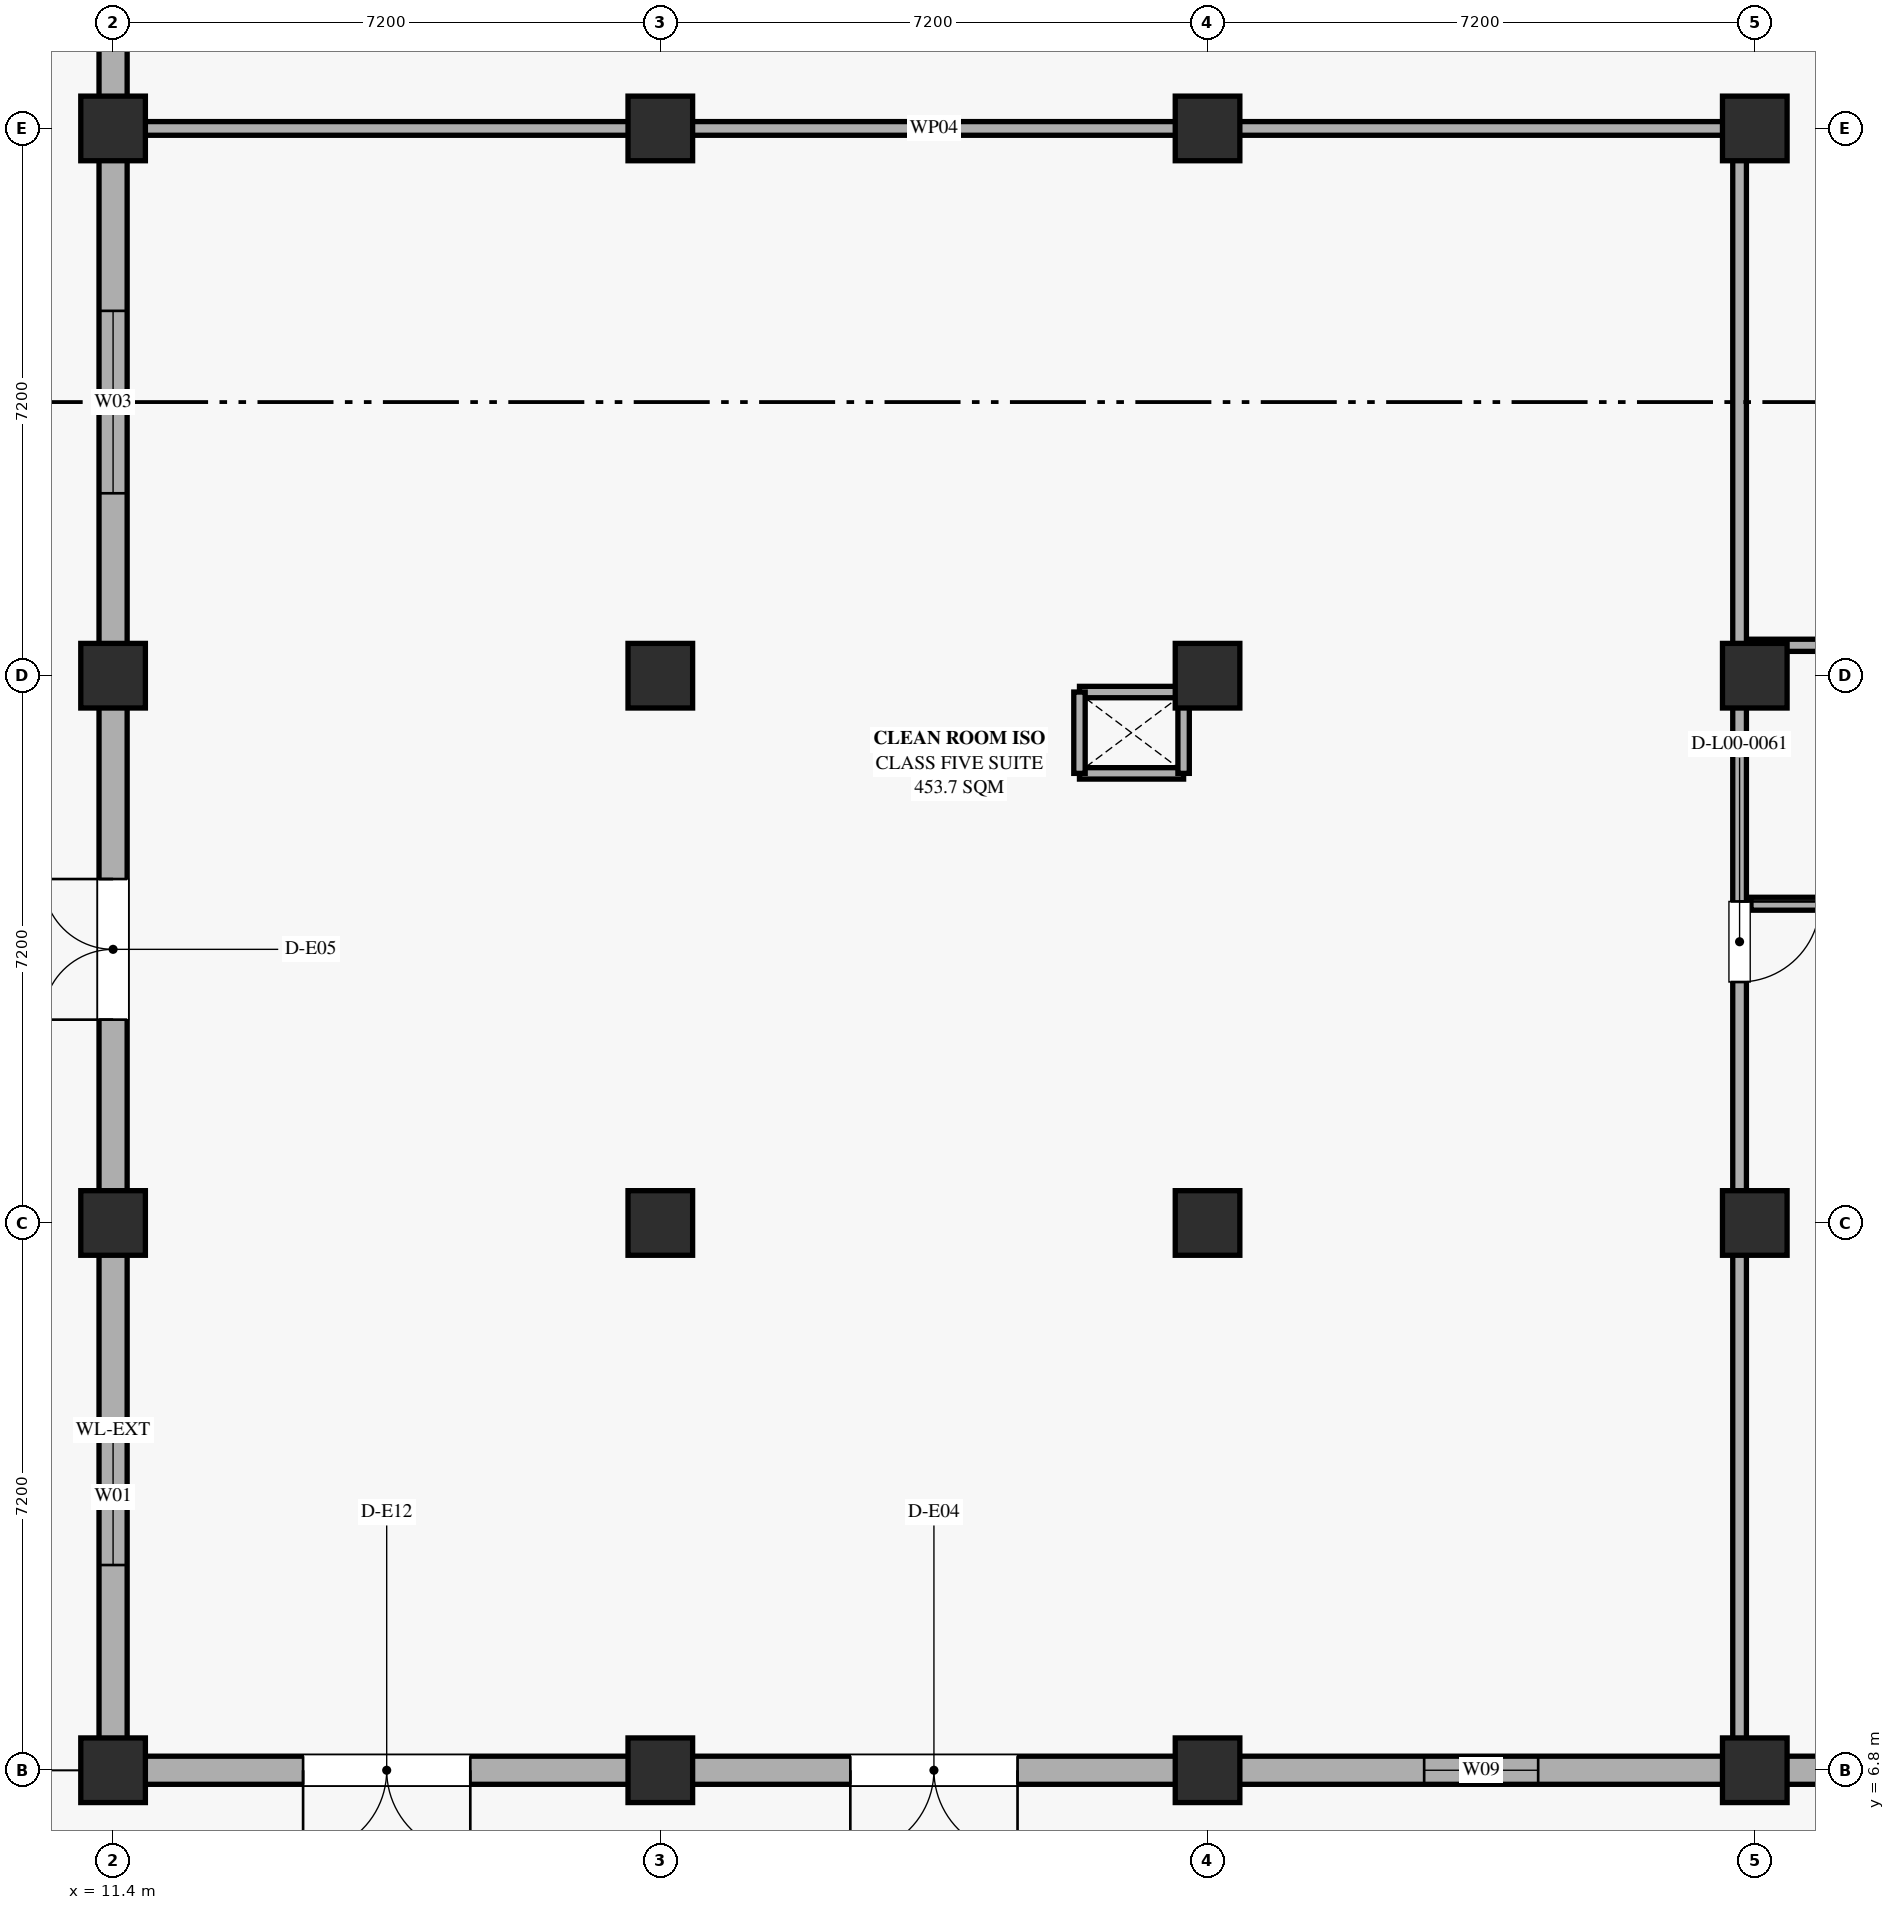
"""IFC4 building model, lengths in metres.
Left out: names, types, materials, properties, quantities, classifications, styles, units other than length and angle.
Written with IfcOpenShell. Run it as: python <this file> out.ifc"""

import sys

from ifc_helpers import new_model, si_unit, direction, frame, frame_2d, origin, origin_2d, place, context, subcontext, project, spatial, rectangle, extrude, element, fill, save


model = new_model("IFC4")
c1 = context("Model", 3, precision=1e-05, world=origin(), true_north=direction((0.0, 1.0)))
c2 = subcontext(c1, "Body", "Model", "MODEL_VIEW")
j1 = project(units=[si_unit("LENGTHUNIT", "METRE"), si_unit("PLANEANGLEUNIT", "RADIAN")], contexts=[c1])
p1 = place(None, origin())
s1 = spatial("IfcSite", under=j1, at=p1, CompositionType="ELEMENT")
p2 = place(p1, origin())
s2 = spatial("IfcBuilding", under=s1, at=p2, CompositionType="ELEMENT")
p3 = place(p2, origin())
s3 = spatial("IfcBuildingStorey", under=s2, at=p3, CompositionType="ELEMENT", Elevation=0.0)
for number, where, z_axis, x_axis in (
    (1, (11.4, 6.8, 0.0), (0.0, 0.0, 1.0), (1.0, 0.0, 0.0)),
    (2, (18.6, 6.8, 0.0), (0.0, 0.0, 1.0), (1.0, 0.0, 0.0)),
    (3, (25.8, 6.8, 0.0), (0.0, 0.0, 1.0), (1.0, 0.0, 0.0)),
    (4, (33.0, 6.8, 0.0), (0.0, 0.0, 1.0), (1.0, 0.0, 0.0)),
    (5, (11.4, 14.0, 0.0), (0.0, 0.0, 1.0), (1.0, 0.0, 0.0)),
    (6, (18.6, 14.0, 0.0), (0.0, 0.0, 1.0), (1.0, 0.0, 0.0)),
    (7, (25.8, 14.0, 0.0), (0.0, 0.0, 1.0), (1.0, 0.0, 0.0)),
    (8, (33.0, 14.0, 0.0), (0.0, 0.0, 1.0), (1.0, 0.0, 0.0)),
    (9, (11.4, 21.2, 0.0), (0.0, 0.0, 1.0), (1.0, 0.0, 0.0)),
    (10, (18.6, 21.2, 0.0), (0.0, 0.0, 1.0), (1.0, 0.0, 0.0)),
    (11, (25.8, 21.2, 0.0), (0.0, 0.0, 1.0), (1.0, 0.0, 0.0)),
    (12, (33.0, 21.2, 0.0), (0.0, 0.0, 1.0), (1.0, 0.0, 0.0)),
    (13, (11.4, 28.4, 0.0), (0.0, 0.0, 1.0), (1.0, 0.0, 0.0)),
    (14, (18.6, 28.4, 0.0), (0.0, 0.0, 1.0), (1.0, 0.0, 0.0)),
    (15, (25.8, 28.4, 0.0), (0.0, 0.0, 1.0), (1.0, 0.0, 0.0)),
    (16, (33.0, 28.4, 0.0), (0.0, 0.0, 1.0), (1.0, 0.0, 0.0)),
):
    element("IfcColumn", number, at=place(p3, frame(where, z_axis=z_axis, x_axis=x_axis)), inside=s3, PredefinedType="COLUMN", context=c2, shape_type="SweptSolid", body=[
        extrude(rectangle(XDim=0.85, YDim=0.85, at=origin_2d()), origin(), (0.0, 0.0, 1.0), 5.4),
    ])
p4 = place(p3, frame((11.4, 7.21, 0.0), z_axis=(0.0, 0.0, 1.0), x_axis=(0.0, 1.0, 0.0)))
e17 = element("IfcWall", 17, at=p4, inside=s3, PredefinedType="SOLIDWALL", context=c2, shape_type="SweptSolid", body=[
    extrude(rectangle(XDim=6.38, YDim=0.37, at=frame_2d((3.19, 0.0))), origin(), (0.0, 0.0, 1.0), 3.9),
])
p5 = place(p4, frame((2.29, 0.0, 0.9)))
e18 = element("IfcOpeningElement", 18, at=p5, cuts=e17, PredefinedType="OPENING", context=c2, shape_type="SweptSolid", body=[
    extrude(rectangle(XDim=1.8, YDim=2.4, at=frame_2d((0.9, 1.2))), frame((0.0, 0.195, 0.0), z_axis=(0.0, -1.0, 0.0), x_axis=(1.0, 0.0, 0.0)), (0.0, 0.0, 1.0), 0.39),
])
p6 = place(p3, frame((11.4, 14.41, 0.0), z_axis=(0.0, 0.0, 1.0), x_axis=(0.0, 1.0, 0.0)))
e19 = element("IfcWall", 19, at=p6, inside=s3, PredefinedType="SOLIDWALL", context=c2, shape_type="SweptSolid", body=[
    extrude(rectangle(XDim=6.38, YDim=0.37, at=frame_2d((3.19, 0.0))), origin(), (0.0, 0.0, 1.0), 3.9),
])
p7 = place(p6, frame((2.265, 0.0, 0.0)))
e20 = element("IfcOpeningElement", 20, at=p7, cuts=e19, PredefinedType="OPENING", context=c2, shape_type="SweptSolid", body=[
    extrude(rectangle(XDim=1.85, YDim=2.35, at=frame_2d((0.925, 1.175))), frame((0.0, 0.195, 0.0), z_axis=(0.0, -1.0, 0.0), x_axis=(1.0, 0.0, 0.0)), (0.0, 0.0, 1.0), 0.39),
])
p8 = place(p3, frame((11.4, 21.61, 0.0), z_axis=(0.0, 0.0, 1.0), x_axis=(0.0, 1.0, 0.0)))
e21 = element("IfcWall", 21, at=p8, inside=s3, PredefinedType="SOLIDWALL", context=c2, shape_type="SweptSolid", body=[
    extrude(rectangle(XDim=6.38, YDim=0.37, at=frame_2d((3.19, 0.0))), origin(), (0.0, 0.0, 1.0), 3.9),
])
p9 = place(p8, frame((1.99, 0.0, 0.9)))
e22 = element("IfcOpeningElement", 22, at=p9, cuts=e21, PredefinedType="OPENING", context=c2, shape_type="SweptSolid", body=[
    extrude(rectangle(XDim=2.4, YDim=2.4, at=frame_2d((1.2, 1.2))), frame((0.0, 0.195, 0.0), z_axis=(0.0, -1.0, 0.0), x_axis=(1.0, 0.0, 0.0)), (0.0, 0.0, 1.0), 0.39),
])
p10 = place(p3, frame((11.4, 28.81, 0.0), z_axis=(0.0, 0.0, 1.0), x_axis=(0.0, 1.0, 0.0)))
e23 = element("IfcWall", 23, at=p10, inside=s3, PredefinedType="SOLIDWALL", context=c2, shape_type="SweptSolid", body=[
    extrude(rectangle(XDim=6.38, YDim=0.37, at=frame_2d((3.19, 0.0))), origin(), (0.0, 0.0, 1.0), 3.9),
])
p11 = place(p10, frame((2.44, 0.0, 0.9)))
e24 = element("IfcOpeningElement", 24, at=p11, cuts=e23, PredefinedType="OPENING", context=c2, shape_type="SweptSolid", body=[
    extrude(rectangle(XDim=1.5, YDim=2.4, at=frame_2d((0.75, 1.2))), frame((0.0, 0.195, 0.0), z_axis=(0.0, -1.0, 0.0), x_axis=(1.0, 0.0, 0.0)), (0.0, 0.0, 1.0), 0.39),
])
p12 = place(p3, frame((39.79, 6.8, 0.0), z_axis=(0.0, 0.0, 1.0), x_axis=(-1.0, 0.0, 0.0)))
e25 = element("IfcWall", 25, at=p12, inside=s3, PredefinedType="SOLIDWALL", context=c2, shape_type="SweptSolid", body=[
    extrude(rectangle(XDim=6.38, YDim=0.37, at=frame_2d((3.19, 0.0))), origin(), (0.0, 0.0, 1.0), 3.9),
])
p13 = place(p12, frame((2.09, 0.0, 0.0)))
e26 = element("IfcOpeningElement", 26, at=p13, cuts=e25, PredefinedType="OPENING", context=c2, shape_type="SweptSolid", body=[
    extrude(rectangle(XDim=2.2, YDim=2.4, at=frame_2d((1.1, 1.2))), frame((0.0, 0.195, 0.0), z_axis=(0.0, -1.0, 0.0), x_axis=(1.0, 0.0, 0.0)), (0.0, 0.0, 1.0), 0.39),
])
p14 = place(p3, frame((32.59, 6.8, 0.0), z_axis=(0.0, 0.0, 1.0), x_axis=(-1.0, 0.0, 0.0)))
e27 = element("IfcWall", 27, at=p14, inside=s3, PredefinedType="SOLIDWALL", context=c2, shape_type="SweptSolid", body=[
    extrude(rectangle(XDim=6.38, YDim=0.37, at=frame_2d((3.19, 0.0))), origin(), (0.0, 0.0, 1.0), 3.9),
])
p15 = place(p14, frame((2.44, 0.0, 0.9)))
e28 = element("IfcOpeningElement", 28, at=p15, cuts=e27, PredefinedType="OPENING", context=c2, shape_type="SweptSolid", body=[
    extrude(rectangle(XDim=1.5, YDim=2.1, at=frame_2d((0.75, 1.05))), frame((0.0, 0.195, 0.0), z_axis=(0.0, -1.0, 0.0), x_axis=(1.0, 0.0, 0.0)), (0.0, 0.0, 1.0), 0.39),
])
p16 = place(p3, frame((25.39, 6.8, 0.0), z_axis=(0.0, 0.0, 1.0), x_axis=(-1.0, 0.0, 0.0)))
e29 = element("IfcWall", 29, at=p16, inside=s3, PredefinedType="SOLIDWALL", context=c2, shape_type="SweptSolid", body=[
    extrude(rectangle(XDim=6.38, YDim=0.37, at=frame_2d((3.19, 0.0))), origin(), (0.0, 0.0, 1.0), 3.9),
])
p17 = place(p16, frame((2.09, 0.0, 0.0)))
e30 = element("IfcOpeningElement", 30, at=p17, cuts=e29, PredefinedType="OPENING", context=c2, shape_type="SweptSolid", body=[
    extrude(rectangle(XDim=2.2, YDim=2.4, at=frame_2d((1.1, 1.2))), frame((0.0, 0.195, 0.0), z_axis=(0.0, -1.0, 0.0), x_axis=(1.0, 0.0, 0.0)), (0.0, 0.0, 1.0), 0.39),
])
p18 = place(p3, frame((18.19, 6.8, 0.0), z_axis=(0.0, 0.0, 1.0), x_axis=(-1.0, 0.0, 0.0)))
e31 = element("IfcWall", 31, at=p18, inside=s3, PredefinedType="SOLIDWALL", context=c2, shape_type="SweptSolid", body=[
    extrude(rectangle(XDim=6.38, YDim=0.37, at=frame_2d((3.19, 0.0))), origin(), (0.0, 0.0, 1.0), 3.9),
])
p19 = place(p18, frame((2.09, 0.0, 0.0)))
e32 = element("IfcOpeningElement", 32, at=p19, cuts=e31, PredefinedType="OPENING", context=c2, shape_type="SweptSolid", body=[
    extrude(rectangle(XDim=2.2, YDim=2.4, at=frame_2d((1.1, 1.2))), frame((0.0, 0.195, 0.0), z_axis=(0.0, -1.0, 0.0), x_axis=(1.0, 0.0, 0.0)), (0.0, 0.0, 1.0), 0.39),
])
for number, where, z_axis, x_axis in (
    (33, (25.485, 19.915, 0.0), (0.0, 0.0, 1.0), (-1.0, 0.0, 0.0)),
    (34, (24.115, 20.985, 0.0), (0.0, 0.0, 1.0), (1.0, 0.0, 0.0)),
):
    element("IfcWall", number, at=place(p3, frame(where, z_axis=z_axis, x_axis=x_axis)), inside=s3, PredefinedType="PARTITIONING", context=c2, shape_type="SweptSolid", body=[
        extrude(rectangle(XDim=1.37, YDim=0.15, at=frame_2d((0.685, 0.0))), origin(), (0.0, 0.0, 1.0), 3.88),
    ])
for number, where, z_axis, x_axis in (
    (35, (24.115, 19.915, 0.0), (0.0, 0.0, 1.0), (0.0, 1.0, 0.0)),
    (36, (25.485, 20.985, 0.0), (0.0, 0.0, 1.0), (0.0, -1.0, 0.0)),
):
    element("IfcWall", number, at=place(p3, frame(where, z_axis=z_axis, x_axis=x_axis)), inside=s3, PredefinedType="PARTITIONING", context=c2, shape_type="SweptSolid", body=[
        extrude(rectangle(XDim=1.07, YDim=0.15, at=frame_2d((0.535, 0.0))), origin(), (0.0, 0.0, 1.0), 3.88),
    ])
p20 = place(p3, frame((11.75, 28.4, 0.0), z_axis=(0.0, 0.0, 1.0), x_axis=(1.0, 0.0, 0.0)))
e37 = element("IfcWall", 37, at=p20, inside=s3, PredefinedType="PARTITIONING", context=c2, shape_type="SweptSolid", body=[
    extrude(rectangle(XDim=20.9, YDim=0.18, at=frame_2d((10.45, 0.0))), origin(), (0.0, 0.0, 1.0), 3.88),
])
p21 = place(p3, frame((32.8, 28.25, 0.0), z_axis=(0.0, 0.0, 1.0), x_axis=(0.0, -1.0, 0.0)))
e38 = element("IfcWall", 38, at=p21, inside=s3, PredefinedType="PARTITIONING", context=c2, shape_type="SweptSolid", body=[
    extrude(rectangle(XDim=21.1, YDim=0.18, at=frame_2d((10.55, 0.0))), origin(), (0.0, 0.0, 1.0), 3.88),
])
p22 = place(p21, frame((10.02, 0.0, 0.0)))
e39 = element("IfcOpeningElement", 39, at=p22, cuts=e38, PredefinedType="OPENING", context=c2, shape_type="SweptSolid", body=[
    extrude(rectangle(XDim=1.06, YDim=2.18, at=frame_2d((0.53, 1.09))), frame((0.0, 0.1, 0.0), z_axis=(0.0, -1.0, 0.0), x_axis=(1.0, 0.0, 0.0)), (0.0, 0.0, 1.0), 0.2),
])
p23 = place(p3, frame((32.95, 18.2, 0.0), z_axis=(0.0, 0.0, 1.0), x_axis=(1.0, 0.0, 0.0)))
e40 = element("IfcWall", 40, at=p23, inside=s3, PredefinedType="PARTITIONING", context=c2, shape_type="SweptSolid", body=[
    extrude(rectangle(XDim=21.5, YDim=0.17, at=frame_2d((10.75, 0.0))), origin(), (0.0, 0.0, 1.0), 3.88),
])
p24 = place(p23, frame((10.3, 0.0, 0.0)))
e41 = element("IfcOpeningElement", 41, at=p24, cuts=e40, PredefinedType="OPENING", context=c2, shape_type="SweptSolid", body=[
    extrude(rectangle(XDim=1.1, YDim=2.06, at=frame_2d((0.55, 1.03))), frame((0.0, 0.095, 0.0), z_axis=(0.0, -1.0, 0.0), x_axis=(1.0, 0.0, 0.0)), (0.0, 0.0, 1.0), 0.19),
])
p25 = place(p3, frame((52.05, 21.6, 0.0), z_axis=(0.0, 0.0, 1.0), x_axis=(-1.0, 0.0, 0.0)))
e42 = element("IfcWall", 42, at=p25, inside=s3, PredefinedType="PARTITIONING", context=c2, shape_type="SweptSolid", body=[
    extrude(rectangle(XDim=19.1, YDim=0.16, at=frame_2d((9.55, 0.0))), origin(), (0.0, 0.0, 1.0), 3.88),
])
p26 = place(p25, frame((7.7, 0.0, 0.0)))
e43 = element("IfcOpeningElement", 43, at=p26, cuts=e42, PredefinedType="OPENING", context=c2, shape_type="SweptSolid", body=[
    extrude(rectangle(XDim=1.1, YDim=2.12, at=frame_2d((0.55, 1.06))), frame((0.0, 0.09, 0.0), z_axis=(0.0, -1.0, 0.0), x_axis=(1.0, 0.0, 0.0)), (0.0, 0.0, 1.0), 0.18),
])
p27 = place(p5, origin())
e44 = element("IfcWindow", 44, at=p27, inside=s3, PartitioningType="DOUBLE_PANEL_VERTICAL", PredefinedType="WINDOW", context=c2, shape_type="SweptSolid", body=[
    extrude(rectangle(XDim=1.8, YDim=2.4, at=frame_2d((0.9, 1.2))), frame((0.0, 0.03, 0.0), z_axis=(0.0, -1.0, 0.0), x_axis=(1.0, 0.0, 0.0)), (0.0, 0.0, 1.0), 0.06),
])
fill(e18, e44)
p28 = place(p7, origin())
e45 = element("IfcDoor", 45, at=p28, inside=s3, OperationType="DOUBLE_DOOR_SINGLE_SWING", PredefinedType="DOOR", context=c2, shape_type="SweptSolid", body=[
    extrude(rectangle(XDim=1.85, YDim=2.35, at=frame_2d((0.925, 1.175))), frame((0.0, 0.025, 0.0), z_axis=(0.0, -1.0, 0.0), x_axis=(1.0, 0.0, 0.0)), (0.0, 0.0, 1.0), 0.05),
])
fill(e20, e45)
p29 = place(p9, origin())
e46 = element("IfcWindow", 46, at=p29, inside=s3, PartitioningType="DOUBLE_PANEL_VERTICAL", PredefinedType="WINDOW", context=c2, shape_type="SweptSolid", body=[
    extrude(rectangle(XDim=2.4, YDim=2.4, at=frame_2d((1.2, 1.2))), frame((0.0, 0.03, 0.0), z_axis=(0.0, -1.0, 0.0), x_axis=(1.0, 0.0, 0.0)), (0.0, 0.0, 1.0), 0.06),
])
fill(e22, e46)
p30 = place(p15, origin())
e47 = element("IfcWindow", 47, at=p30, inside=s3, PartitioningType="SINGLE_PANEL", PredefinedType="WINDOW", context=c2, shape_type="SweptSolid", body=[
    extrude(rectangle(XDim=1.5, YDim=2.1, at=frame_2d((0.75, 1.05))), frame((0.0, 0.03, 0.0), z_axis=(0.0, -1.0, 0.0), x_axis=(1.0, 0.0, 0.0)), (0.0, 0.0, 1.0), 0.06),
])
fill(e28, e47)
p31 = place(p17, origin())
e48 = element("IfcDoor", 48, at=p31, inside=s3, OperationType="DOUBLE_DOOR_SINGLE_SWING", PredefinedType="DOOR", context=c2, shape_type="SweptSolid", body=[
    extrude(rectangle(XDim=2.2, YDim=2.4, at=frame_2d((1.1, 1.2))), frame((0.0, 0.025, 0.0), z_axis=(0.0, -1.0, 0.0), x_axis=(1.0, 0.0, 0.0)), (0.0, 0.0, 1.0), 0.05),
])
fill(e30, e48)
p32 = place(p19, origin())
e49 = element("IfcDoor", 49, at=p32, inside=s3, OperationType="DOUBLE_DOOR_SINGLE_SWING", PredefinedType="DOOR", context=c2, shape_type="SweptSolid", body=[
    extrude(rectangle(XDim=2.2, YDim=2.4, at=frame_2d((1.1, 1.2))), frame((0.0, 0.025, 0.0), z_axis=(0.0, -1.0, 0.0), x_axis=(1.0, 0.0, 0.0)), (0.0, 0.0, 1.0), 0.05),
])
fill(e32, e49)
p33 = place(p22, origin())
e50 = element("IfcDoor", 50, at=p33, inside=s3, OperationType="SINGLE_SWING_LEFT", PredefinedType="DOOR", context=c2, shape_type="SweptSolid", body=[
    extrude(rectangle(XDim=1.06, YDim=2.18, at=frame_2d((0.53, 1.09))), frame((0.0, 0.025, 0.0), z_axis=(0.0, -1.0, 0.0), x_axis=(1.0, 0.0, 0.0)), (0.0, 0.0, 1.0), 0.05),
])
fill(e39, e50)
save(model, sys.argv[1])
